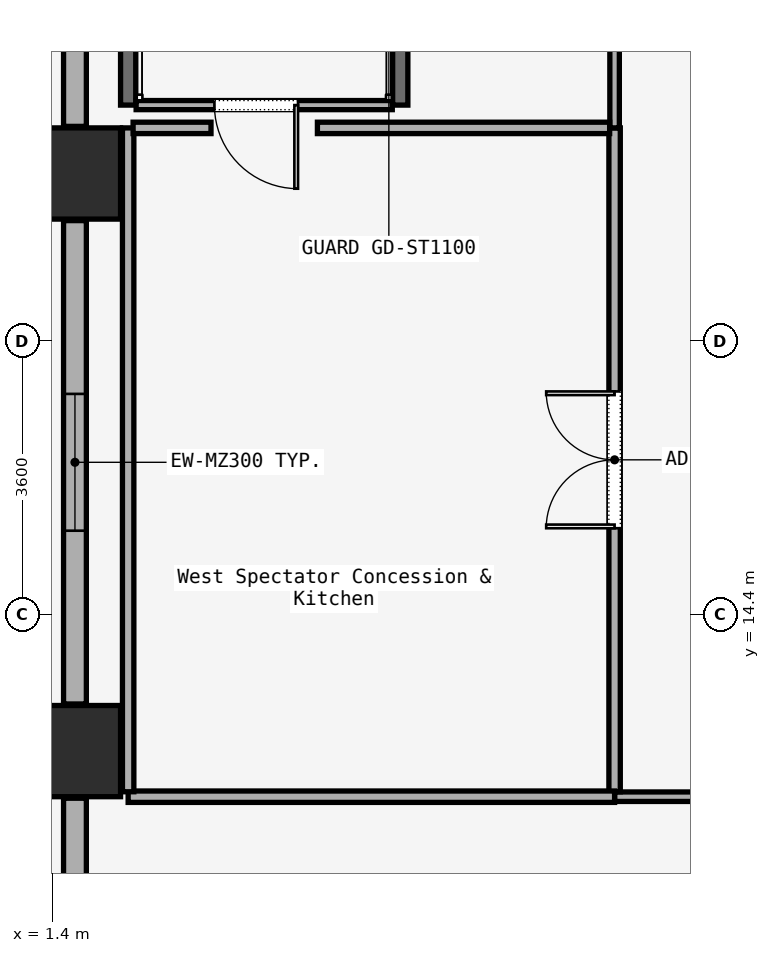
"""IFC4 building model, lengths in metres.
Left out: names, types, materials, properties, quantities, classifications, styles, units other than length and angle.
Written with IfcOpenShell. Run it as: python <this file> out.ifc"""

import sys

from ifc_helpers import new_model, si_unit, direction, frame, frame_2d, origin, origin_2d, place, context, subcontext, project, spatial, rectangle, extrude, element, fill, save


model = new_model("IFC4")
c1 = context("Model", 3, precision=1e-05, world=origin(), true_north=direction((0.0, 1.0)))
c2 = subcontext(c1, "Body", "Model", "MODEL_VIEW")
j1 = project(units=[si_unit("LENGTHUNIT", "METRE"), si_unit("PLANEANGLEUNIT", "RADIAN")], contexts=[c1])
p1 = place(None, origin())
s1 = spatial("IfcSite", under=j1, at=p1, CompositionType="ELEMENT")
p2 = place(p1, origin())
s2 = spatial("IfcBuilding", under=s1, at=p2, CompositionType="ELEMENT")
p3 = place(p2, frame((0.0, 0.0, 6.0)))
s3 = spatial("IfcBuildingStorey", under=s2, at=p3, CompositionType="ELEMENT", Elevation=6.0)
for number, where, z_axis, x_axis in (
    (1, (1.7, 12.6, 0.0), (0.0, 0.0, 1.0), (1.0, 0.0, 0.0)),
    (2, (1.7, 20.2, 0.0), (0.0, 0.0, 1.0), (1.0, 0.0, 0.0)),
):
    element("IfcColumn", number, at=place(p3, frame(where, z_axis=z_axis, x_axis=x_axis)), inside=s3, PredefinedType="COLUMN", context=c2, shape_type="SweptSolid", body=[
        extrude(rectangle(XDim=1.2, YDim=1.2, at=origin_2d()), origin(), (0.0, 0.0, 1.0), 5.7),
    ])
p4 = place(p3, frame((1.7, 5.62, 0.0), z_axis=(0.0, 0.0, 1.0), x_axis=(0.0, 1.0, 0.0)))
e3 = element("IfcWall", 3, at=p4, inside=s3, PredefinedType="SOLIDWALL", context=c2, shape_type="SweptSolid", body=[
    extrude(rectangle(XDim=6.36, YDim=0.3, at=frame_2d((3.18, 0.0))), origin(), (0.0, 0.0, 1.0), 5.7),
])
p5 = place(p4, frame((2.28, 0.0, 1.0)))
e4 = element("IfcOpeningElement", 4, at=p5, cuts=e3, PredefinedType="OPENING", context=c2, shape_type="SweptSolid", body=[
    extrude(rectangle(XDim=1.8, YDim=2.2, at=frame_2d((0.9, 1.1))), frame((0.0, 0.15, 0.0), z_axis=(0.0, -1.0, 0.0), x_axis=(1.0, 0.0, 0.0)), (0.0, 0.0, 1.0), 0.3),
])
p6 = place(p3, frame((1.7, 13.22, 0.0), z_axis=(0.0, 0.0, 1.0), x_axis=(0.0, 1.0, 0.0)))
e5 = element("IfcWall", 5, at=p6, inside=s3, PredefinedType="SOLIDWALL", context=c2, shape_type="SweptSolid", body=[
    extrude(rectangle(XDim=6.36, YDim=0.3, at=frame_2d((3.18, 0.0))), origin(), (0.0, 0.0, 1.0), 5.7),
])
p7 = place(p6, frame((2.28, 0.0, 1.0)))
e6 = element("IfcOpeningElement", 6, at=p7, cuts=e5, PredefinedType="OPENING", context=c2, shape_type="SweptSolid", body=[
    extrude(rectangle(XDim=1.8, YDim=2.2, at=frame_2d((0.9, 1.1))), frame((0.0, 0.15, 0.0), z_axis=(0.0, -1.0, 0.0), x_axis=(1.0, 0.0, 0.0)), (0.0, 0.0, 1.0), 0.3),
])
p8 = place(p3, frame((1.7, 20.82, 0.0), z_axis=(0.0, 0.0, 1.0), x_axis=(0.0, 1.0, 0.0)))
e7 = element("IfcWall", 7, at=p8, inside=s3, PredefinedType="SOLIDWALL", context=c2, shape_type="SweptSolid", body=[
    extrude(rectangle(XDim=6.36, YDim=0.3, at=frame_2d((3.18, 0.0))), origin(), (0.0, 0.0, 1.0), 5.7),
])
p9 = place(p8, frame((2.28, 0.0, 1.0)))
e8 = element("IfcOpeningElement", 8, at=p9, cuts=e7, PredefinedType="OPENING", context=c2, shape_type="SweptSolid", body=[
    extrude(rectangle(XDim=1.8, YDim=2.2, at=frame_2d((0.9, 1.1))), frame((0.0, 0.15, 0.0), z_axis=(0.0, -1.0, 0.0), x_axis=(1.0, 0.0, 0.0)), (0.0, 0.0, 1.0), 0.3),
])
for number, where, z_axis, x_axis in (
    (9, (5.98, 21.1, 0.0), (0.0, 0.0, 1.0), (0.0, 1.0, 0.0)),
    (10, (2.4, 21.1, 0.0), (0.0, 0.0, 1.0), (0.0, 1.0, 0.0)),
):
    element("IfcWall", number, at=place(p3, frame(where, z_axis=z_axis, x_axis=x_axis)), inside=s3, PredefinedType="SOLIDWALL", context=c2, shape_type="SweptSolid", body=[
        extrude(rectangle(XDim=7.95, YDim=0.2, at=frame_2d((3.975, 0.0))), origin(), (0.0, 0.0, 1.0), 6.0),
    ])
p10 = place(p3, frame((5.875, 21.1, 0.0), z_axis=(0.0, 0.0, 1.0), x_axis=(-1.0, 0.0, 0.0)))
e11 = element("IfcWall", 11, at=p10, inside=s3, PredefinedType="SOLIDWALL", context=c2, shape_type="SweptSolid", body=[
    extrude(rectangle(XDim=3.37, YDim=0.12, at=frame_2d((1.685, 0.0))), origin(), (0.0, 0.0, 1.0), 4.819),
])
p11 = place(p10, frame((1.24, 0.0, 0.0)))
e12 = element("IfcOpeningElement", 12, at=p11, cuts=e11, PredefinedType="OPENING", context=c2, shape_type="SweptSolid", body=[
    extrude(rectangle(XDim=1.1, YDim=2.2, at=frame_2d((0.55, 1.1))), frame((0.0, 0.06, 0.0), z_axis=(0.0, -1.0, 0.0), x_axis=(1.0, 0.0, 0.0)), (0.0, 0.0, 1.0), 0.12),
])
p12 = place(p3, frame((14.435, 12.0, 0.0), z_axis=(0.0, 0.0, 1.0), x_axis=(-1.0, 0.0, 0.0)))
e13 = element("IfcWall", 13, at=p12, inside=s3, PredefinedType="PARTITIONING", context=c2, shape_type="SweptSolid", body=[
    extrude(rectangle(XDim=5.635, YDim=0.125, at=frame_2d((2.817, 0.0))), origin(), (0.0, 0.0, 1.0), 4.819),
])
p13 = place(p3, frame((8.8, 12.065, 0.0), z_axis=(0.0, 0.0, 1.0), x_axis=(0.0, 1.0, 0.0)))
e14 = element("IfcWall", 14, at=p13, inside=s3, PredefinedType="PARTITIONING", context=c2, shape_type="SweptSolid", body=[
    extrude(rectangle(XDim=8.735, YDim=0.15, at=frame_2d((4.368, 0.0))), origin(), (0.0, 0.0, 1.0), 4.819),
])
p14 = place(p13, frame((3.468, 0.0, 0.0)))
e15 = element("IfcOpeningElement", 15, at=p14, cuts=e14, PredefinedType="OPENING", context=c2, shape_type="SweptSolid", body=[
    extrude(rectangle(XDim=1.8, YDim=2.3, at=frame_2d((0.9, 1.15))), frame((0.0, 0.075, 0.0), z_axis=(0.0, -1.0, 0.0), x_axis=(1.0, 0.0, 0.0)), (0.0, 0.0, 1.0), 0.15),
])
p15 = place(p3, frame((8.8, 20.8, 0.0), z_axis=(0.0, 0.0, 1.0), x_axis=(0.0, 1.0, 0.0)))
e16 = element("IfcWall", 16, at=p15, inside=s3, PredefinedType="PARTITIONING", context=c2, shape_type="SweptSolid", body=[
    extrude(rectangle(XDim=22.85, YDim=0.125, at=frame_2d((11.425, 0.0))), origin(), (0.0, 0.0, 1.0), 4.819),
])
p16 = place(p3, frame((8.8, 12.0, 0.0), z_axis=(0.0, 0.0, 1.0), x_axis=(-1.0, 0.0, 0.0)))
e17 = element("IfcWall", 17, at=p16, inside=s3, PredefinedType="PARTITIONING", context=c2, shape_type="SweptSolid", body=[
    extrude(rectangle(XDim=6.4, YDim=0.15, at=frame_2d((3.2, 0.0))), origin(), (0.0, 0.0, 1.0), 4.819),
])
p17 = place(p3, frame((2.4, 12.065, 0.0), z_axis=(0.0, 0.0, 1.0), x_axis=(0.0, 1.0, 0.0)))
e18 = element("IfcWall", 18, at=p17, inside=s3, PredefinedType="PARTITIONING", context=c2, shape_type="SweptSolid", body=[
    extrude(rectangle(XDim=8.735, YDim=0.15, at=frame_2d((4.368, 0.0))), origin(), (0.0, 0.0, 1.0), 4.819),
])
p18 = place(p3, frame((2.465, 20.8, 0.0), z_axis=(0.0, 0.0, 1.0), x_axis=(1.0, 0.0, 0.0)))
e19 = element("IfcWall", 19, at=p18, inside=s3, PredefinedType="PARTITIONING", context=c2, shape_type="SweptSolid", body=[
    extrude(rectangle(XDim=1.025, YDim=0.15, at=frame_2d((0.512, 0.0))), origin(), (0.0, 0.0, 1.0), 4.819),
])
p19 = place(p3, frame((4.89, 20.8, 0.0), z_axis=(0.0, 0.0, 1.0), x_axis=(1.0, 0.0, 0.0)))
e20 = element("IfcWall", 20, at=p19, inside=s3, PredefinedType="PARTITIONING", context=c2, shape_type="SweptSolid", body=[
    extrude(rectangle(XDim=3.845, YDim=0.15, at=frame_2d((1.923, 0.0))), origin(), (0.0, 0.0, 1.0), 4.819),
])
p20 = place(p7, origin())
e21 = element("IfcWindow", 21, at=p20, inside=s3, PartitioningType="SINGLE_PANEL", PredefinedType="WINDOW", context=c2, shape_type="SweptSolid", body=[
    extrude(rectangle(XDim=1.8, YDim=2.2, at=frame_2d((0.9, 1.1))), frame((0.0, 0.03, 0.0), z_axis=(0.0, -1.0, 0.0), x_axis=(1.0, 0.0, 0.0)), (0.0, 0.0, 1.0), 0.06),
])
fill(e6, e21)
p21 = place(p11, origin())
e22 = element("IfcDoor", 22, at=p21, inside=s3, OperationType="SINGLE_SWING_RIGHT", PredefinedType="DOOR", context=c2, shape_type="SweptSolid", body=[
    extrude(rectangle(XDim=1.1, YDim=2.2, at=frame_2d((0.55, 1.1))), frame((0.0, 0.025, 0.0), z_axis=(0.0, -1.0, 0.0), x_axis=(1.0, 0.0, 0.0)), (0.0, 0.0, 1.0), 0.05),
])
fill(e12, e22)
p22 = place(p14, origin())
e23 = element("IfcDoor", 23, at=p22, inside=s3, OperationType="SINGLE_SWING_RIGHT", PredefinedType="DOOR", context=c2, shape_type="SweptSolid", body=[
    extrude(rectangle(XDim=1.8, YDim=2.3, at=frame_2d((0.9, 1.15))), frame((0.0, 0.025, 0.0), z_axis=(0.0, -1.0, 0.0), x_axis=(1.0, 0.0, 0.0)), (0.0, 0.0, 1.0), 0.05),
])
fill(e15, e23)
save(model, sys.argv[1])
